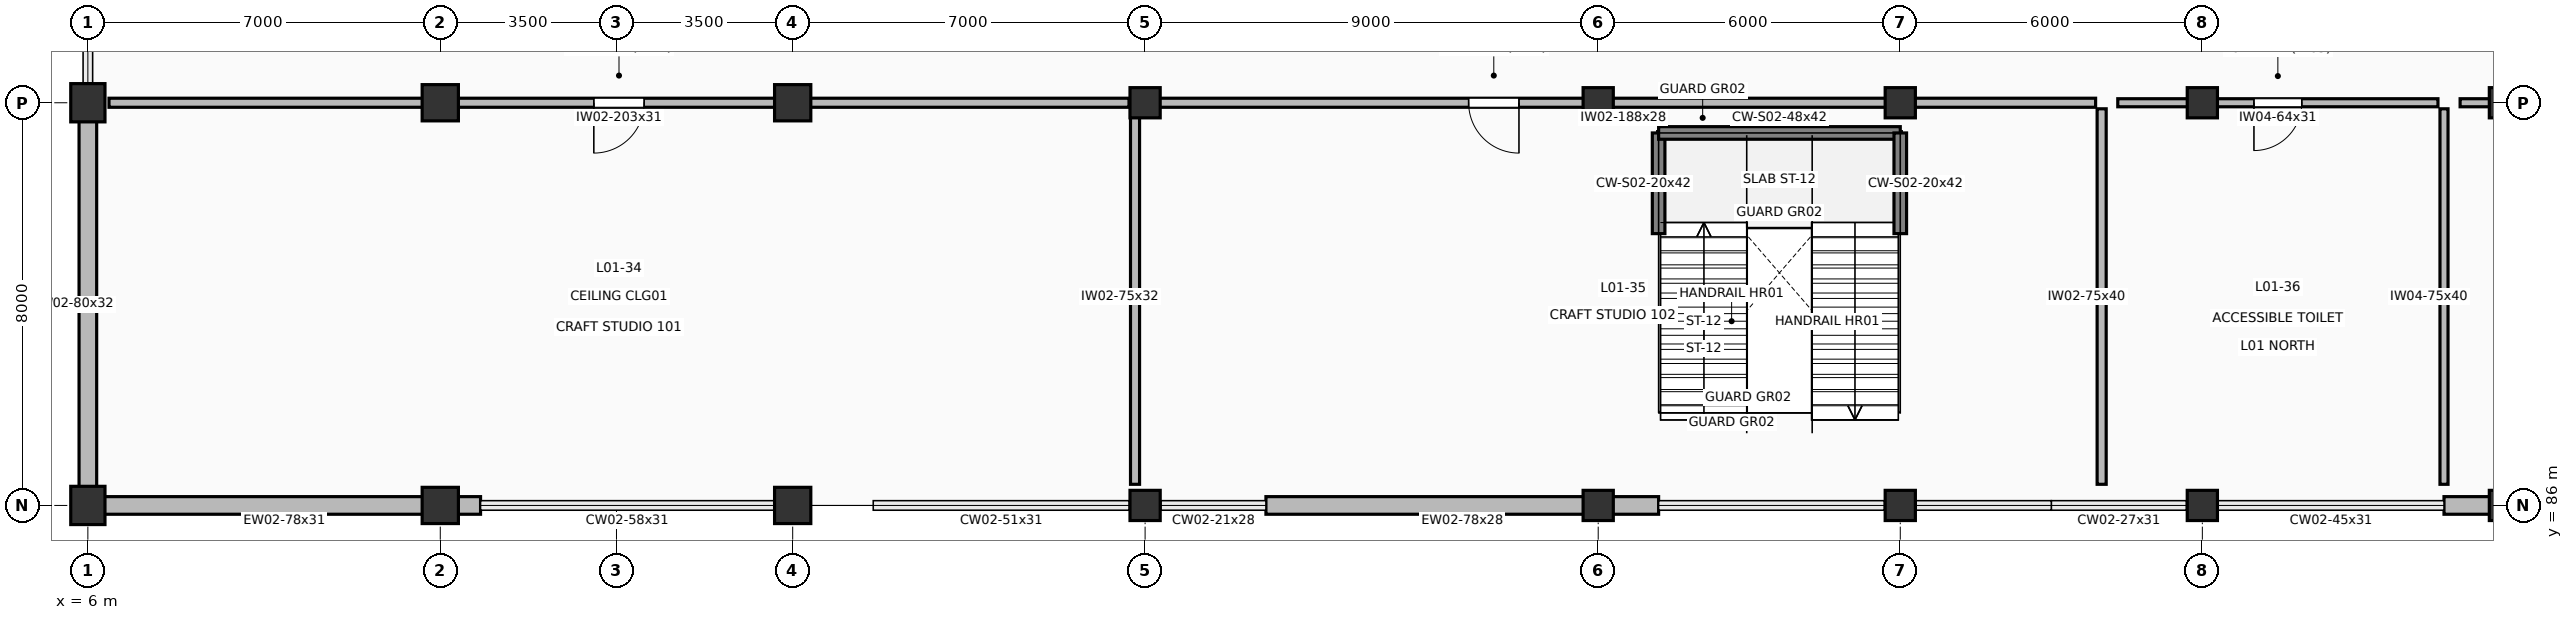
"""IFC4 building model, lengths in metres.
Left out: names, types, materials, properties, quantities, classifications, styles, units other than length and angle.
Written with IfcOpenShell. Run it as: python <this file> out.ifc"""

import sys

from ifc_helpers import new_model, si_unit, direction, frame, frame_2d, origin, origin_2d, place, context, subcontext, project, spatial, rectangle, circle, extrude, element, fill, save


model = new_model("IFC4")
c1 = context("Model", 3, precision=1e-05, world=origin(), true_north=direction((0.0, 1.0)))
c2 = subcontext(c1, "Body", "Model", "MODEL_VIEW")
j1 = project(units=[si_unit("LENGTHUNIT", "METRE"), si_unit("PLANEANGLEUNIT", "RADIAN")], contexts=[c1])
p1 = place(None, origin())
s1 = spatial("IfcSite", under=j1, at=p1, CompositionType="ELEMENT")
p2 = place(p1, origin())
s2 = spatial("IfcBuilding", under=s1, at=p2, CompositionType="ELEMENT")
p3 = place(p2, frame((0.0, 0.0, 5.4)))
s3 = spatial("IfcBuildingStorey", under=s2, at=p3, CompositionType="ELEMENT", Elevation=5.4)
for number, where, z_axis, x_axis in (
    (1, (6.0, 86.0, 0.0), (0.0, 0.0, 1.0), (1.0, 0.0, 0.0)),
    (2, (6.0, 94.0, 0.0), (0.0, 0.0, 1.0), (1.0, 0.0, 0.0)),
):
    element("IfcColumn", number, at=place(p3, frame(where, z_axis=z_axis, x_axis=x_axis)), inside=s3, PredefinedType="PILASTER", context=c2, shape_type="SweptSolid", body=[
        extrude(rectangle(XDim=0.68, YDim=0.76, at=origin_2d()), origin(), (0.0, 0.0, 1.0), 4.2),
    ])
for number, where, z_axis, x_axis in (
    (3, (13.0, 86.0, 0.0), (0.0, 0.0, 1.0), (1.0, 0.0, 0.0)),
    (4, (13.0, 94.0, 0.0), (0.0, 0.0, 1.0), (1.0, 0.0, 0.0)),
    (5, (20.0, 86.0, 0.0), (0.0, 0.0, 1.0), (1.0, 0.0, 0.0)),
    (6, (20.0, 94.0, 0.0), (0.0, 0.0, 1.0), (1.0, 0.0, 0.0)),
):
    element("IfcColumn", number, at=place(p3, frame(where, z_axis=z_axis, x_axis=x_axis)), inside=s3, PredefinedType="COLUMN", context=c2, shape_type="SweptSolid", body=[
        extrude(circle(Radius=0.36, at=origin_2d()), origin(), (0.0, 0.0, 1.0), 4.2),
    ])
for number, where, z_axis, x_axis in (
    (7, (27.0, 86.0, 0.0), (0.0, 0.0, 1.0), (1.0, 0.0, 0.0)),
    (8, (27.0, 94.0, 0.0), (0.0, 0.0, 1.0), (1.0, 0.0, 0.0)),
    (9, (36.0, 86.0, 0.0), (0.0, 0.0, 1.0), (1.0, 0.0, 0.0)),
    (10, (36.0, 94.0, 0.0), (0.0, 0.0, 1.0), (1.0, 0.0, 0.0)),
    (11, (42.0, 86.0, 0.0), (0.0, 0.0, 1.0), (1.0, 0.0, 0.0)),
    (12, (42.0, 94.0, 0.0), (0.0, 0.0, 1.0), (1.0, 0.0, 0.0)),
    (13, (48.0, 86.0, 0.0), (0.0, 0.0, 1.0), (1.0, 0.0, 0.0)),
    (14, (48.0, 94.0, 0.0), (0.0, 0.0, 1.0), (1.0, 0.0, 0.0)),
    (15, (54.0, 86.0, 0.0), (0.0, 0.0, 1.0), (1.0, 0.0, 0.0)),
    (16, (54.0, 94.0, 0.0), (0.0, 0.0, 1.0), (1.0, 0.0, 0.0)),
):
    element("IfcColumn", number, at=place(p3, frame(where, z_axis=z_axis, x_axis=x_axis)), inside=s3, PredefinedType="COLUMN", context=c2, shape_type="SweptSolid", body=[
        extrude(rectangle(XDim=0.6, YDim=0.6, at=origin_2d()), origin(), (0.0, 0.0, 1.0), 4.2),
    ])
p4 = place(p3, frame((6.0, 86.0, 0.0), z_axis=(0.0, 0.0, 1.0), x_axis=(0.0, 1.0, 0.0)))
e17 = element("IfcWall", 17, at=p4, inside=s3, PredefinedType="SOLIDWALL", context=c2, shape_type="SweptSolid", body=[
    extrude(rectangle(XDim=8.0, YDim=0.35, at=frame_2d((4.0, 0.0))), origin(), (0.0, 0.0, 1.0), 3.225),
])
p5 = place(p3, frame((60.0, 86.0, 0.0), z_axis=(0.0, 0.0, 1.0), x_axis=(-1.0, 0.0, 0.0)))
e18 = element("IfcWall", 18, at=p5, inside=s3, PredefinedType="SOLIDWALL", context=c2, shape_type="SweptSolid", body=[
    extrude(rectangle(XDim=7.2, YDim=0.35, at=frame_2d((3.6, 0.0))), origin(), (0.0, 0.0, 1.0), 3.135),
])
p6 = place(p3, frame((37.2, 86.0, 0.0), z_axis=(0.0, 0.0, 1.0), x_axis=(-1.0, 0.0, 0.0)))
e19 = element("IfcWall", 19, at=p6, inside=s3, PredefinedType="SOLIDWALL", context=c2, shape_type="SweptSolid", body=[
    extrude(rectangle(XDim=7.8, YDim=0.35, at=frame_2d((3.9, 0.0))), origin(), (0.0, 0.0, 1.0), 2.765),
])
p7 = place(p3, frame((13.8, 86.0, 0.0), z_axis=(0.0, 0.0, 1.0), x_axis=(-1.0, 0.0, 0.0)))
e20 = element("IfcWall", 20, at=p7, inside=s3, PredefinedType="SOLIDWALL", context=c2, shape_type="SweptSolid", body=[
    extrude(rectangle(XDim=7.8, YDim=0.35, at=frame_2d((3.9, 0.0))), origin(), (0.0, 0.0, 1.0), 3.135),
])
p8 = place(p3, frame((37.2, 91.4, 0.0), z_axis=(0.0, 0.0, 1.0), x_axis=(0.0, 1.0, 0.0)))
e21 = element("IfcWall", 21, at=p8, inside=s3, PredefinedType="SHEAR", context=c2, shape_type="SweptSolid", body=[
    extrude(rectangle(XDim=2.0, YDim=0.25, at=frame_2d((1.0, 0.0))), origin(), (0.0, 0.0, 1.0), 4.2),
])
p9 = place(p3, frame((37.2, 93.4, 0.0), z_axis=(0.0, 0.0, 1.0), x_axis=(1.0, 0.0, 0.0)))
e22 = element("IfcWall", 22, at=p9, inside=s3, PredefinedType="SHEAR", context=c2, shape_type="SweptSolid", body=[
    extrude(rectangle(XDim=4.8, YDim=0.25, at=frame_2d((2.4, 0.0))), origin(), (0.0, 0.0, 1.0), 4.2),
])
p10 = place(p3, frame((42.0, 93.4, 0.0), z_axis=(0.0, 0.0, 1.0), x_axis=(0.0, -1.0, 0.0)))
e23 = element("IfcWall", 23, at=p10, inside=s3, PredefinedType="SHEAR", context=c2, shape_type="SweptSolid", body=[
    extrude(rectangle(XDim=2.0, YDim=0.25, at=frame_2d((1.0, 0.0))), origin(), (0.0, 0.0, 1.0), 4.2),
])
p11 = place(p3, frame((26.68, 94.0, 0.0), z_axis=(0.0, 0.0, 1.0), x_axis=(-1.0, 0.0, 0.0)))
e24 = element("IfcWall", 24, at=p11, inside=s3, PredefinedType="PARTITIONING", context=c2, shape_type="SweptSolid", body=[
    extrude(rectangle(XDim=20.26, YDim=0.18, at=frame_2d((10.13, 0.0))), origin(), (0.0, 0.0, 1.0), 3.135),
])
p12 = place(p11, frame((9.63, 0.0, 0.0)))
e25 = element("IfcOpeningElement", 25, at=p12, cuts=e24, PredefinedType="OPENING", context=c2, shape_type="SweptSolid", body=[
    extrude(rectangle(XDim=1.0, YDim=2.15, at=frame_2d((0.5, 1.075))), frame((0.0, 0.1, 0.0), z_axis=(0.0, -1.0, 0.0), x_axis=(1.0, 0.0, 0.0)), (0.0, 0.0, 1.0), 0.2),
])
p13 = place(p3, frame((26.8, 86.42, 0.0), z_axis=(0.0, 0.0, 1.0), x_axis=(0.0, 1.0, 0.0)))
e26 = element("IfcWall", 26, at=p13, inside=s3, PredefinedType="PARTITIONING", context=c2, shape_type="SweptSolid", body=[
    extrude(rectangle(XDim=7.46, YDim=0.18, at=frame_2d((3.73, 0.0))), origin(), (0.0, 0.0, 1.0), 3.225),
])
p14 = place(p3, frame((45.88, 94.0, 0.0), z_axis=(0.0, 0.0, 1.0), x_axis=(-1.0, 0.0, 0.0)))
e27 = element("IfcWall", 27, at=p14, inside=s3, PredefinedType="PARTITIONING", context=c2, shape_type="SweptSolid", body=[
    extrude(rectangle(XDim=18.76, YDim=0.18, at=frame_2d((9.38, 0.0))), origin(), (0.0, 0.0, 1.0), 2.765),
])
p15 = place(p14, frame((11.454, 0.0, 0.0)))
e28 = element("IfcOpeningElement", 28, at=p15, cuts=e27, PredefinedType="OPENING", context=c2, shape_type="SweptSolid", body=[
    extrude(rectangle(XDim=1.0, YDim=2.15, at=frame_2d((0.5, 1.075))), frame((0.0, 0.1, 0.0), z_axis=(0.0, -1.0, 0.0), x_axis=(1.0, 0.0, 0.0)), (0.0, 0.0, 1.0), 0.2),
])
p16 = place(p3, frame((46.0, 86.42, 0.0), z_axis=(0.0, 0.0, 1.0), x_axis=(0.0, 1.0, 0.0)))
e29 = element("IfcWall", 29, at=p16, inside=s3, PredefinedType="PARTITIONING", context=c2, shape_type="SweptSolid", body=[
    extrude(rectangle(XDim=7.46, YDim=0.18, at=frame_2d((3.73, 0.0))), origin(), (0.0, 0.0, 1.0), 3.98),
])
p17 = place(p3, frame((52.68, 94.0, 0.0), z_axis=(0.0, 0.0, 1.0), x_axis=(-1.0, 0.0, 0.0)))
e30 = element("IfcWall", 30, at=p17, inside=s3, PredefinedType="PLUMBINGWALL", context=c2, shape_type="SweptSolid", body=[
    extrude(rectangle(XDim=6.36, YDim=0.16, at=frame_2d((3.18, 0.0))), origin(), (0.0, 0.0, 1.0), 3.135),
])
p18 = place(p17, frame((2.705, 0.0, 0.0)))
e31 = element("IfcOpeningElement", 31, at=p18, cuts=e30, PredefinedType="OPENING", context=c2, shape_type="SweptSolid", body=[
    extrude(rectangle(XDim=0.95, YDim=2.15, at=frame_2d((0.475, 1.075))), frame((0.0, 0.09, 0.0), z_axis=(0.0, -1.0, 0.0), x_axis=(1.0, 0.0, 0.0)), (0.0, 0.0, 1.0), 0.18),
])
p19 = place(p3, frame((52.8, 86.42, 0.0), z_axis=(0.0, 0.0, 1.0), x_axis=(0.0, 1.0, 0.0)))
e32 = element("IfcWall", 32, at=p19, inside=s3, PredefinedType="PLUMBINGWALL", context=c2, shape_type="SweptSolid", body=[
    extrude(rectangle(XDim=7.46, YDim=0.16, at=frame_2d((3.73, 0.0))), origin(), (0.0, 0.0, 1.0), 3.98),
])
p20 = place(p3, frame((59.68, 94.0, 0.0), z_axis=(0.0, 0.0, 1.0), x_axis=(-1.0, 0.0, 0.0)))
e33 = element("IfcWall", 33, at=p20, inside=s3, PredefinedType="PLUMBINGWALL", context=c2, shape_type="SweptSolid", body=[
    extrude(rectangle(XDim=6.56, YDim=0.16, at=frame_2d((3.28, 0.0))), origin(), (0.0, 0.0, 1.0), 3.135),
])
p21 = place(p20, frame((2.805, 0.0, 0.0)))
e34 = element("IfcOpeningElement", 34, at=p21, cuts=e33, PredefinedType="OPENING", context=c2, shape_type="SweptSolid", body=[
    extrude(rectangle(XDim=0.95, YDim=2.15, at=frame_2d((0.475, 1.075))), frame((0.0, 0.09, 0.0), z_axis=(0.0, -1.0, 0.0), x_axis=(1.0, 0.0, 0.0)), (0.0, 0.0, 1.0), 0.18),
])
p22 = place(p12, origin())
e35 = element("IfcDoor", 35, at=p22, inside=s3, OperationType="SINGLE_SWING_RIGHT", PredefinedType="DOOR", context=c2, shape_type="SweptSolid", body=[
    extrude(rectangle(XDim=1.0, YDim=2.15, at=frame_2d((0.5, 1.075))), frame((0.0, 0.025, 0.0), z_axis=(0.0, -1.0, 0.0), x_axis=(1.0, 0.0, 0.0)), (0.0, 0.0, 1.0), 0.05),
])
fill(e25, e35)
p23 = place(p15, origin())
e36 = element("IfcDoor", 36, at=p23, inside=s3, OperationType="SINGLE_SWING_LEFT", PredefinedType="DOOR", context=c2, shape_type="SweptSolid", body=[
    extrude(rectangle(XDim=1.0, YDim=2.15, at=frame_2d((0.5, 1.075))), frame((0.0, 0.025, 0.0), z_axis=(0.0, -1.0, 0.0), x_axis=(1.0, 0.0, 0.0)), (0.0, 0.0, 1.0), 0.05),
])
fill(e28, e36)
p24 = place(p18, origin())
e37 = element("IfcDoor", 37, at=p24, inside=s3, OperationType="SINGLE_SWING_RIGHT", PredefinedType="DOOR", context=c2, shape_type="SweptSolid", body=[
    extrude(rectangle(XDim=0.95, YDim=2.15, at=frame_2d((0.475, 1.075))), frame((0.0, 0.025, 0.0), z_axis=(0.0, -1.0, 0.0), x_axis=(1.0, 0.0, 0.0)), (0.0, 0.0, 1.0), 0.05),
])
fill(e31, e37)
save(model, sys.argv[1])
